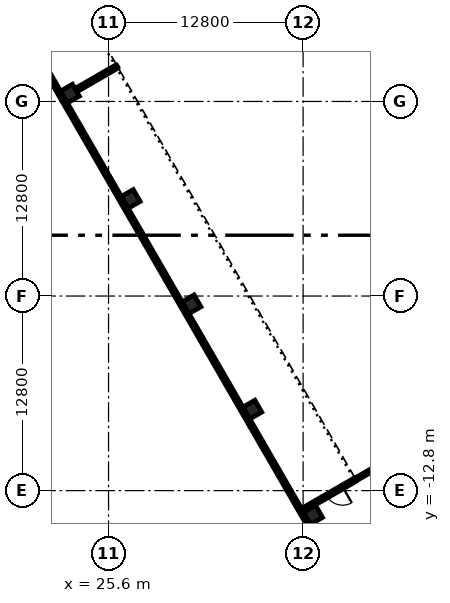
"""IFC4 building model, lengths in metres.
Left out: names, types, materials, properties, quantities, classifications, styles, units other than length and angle.
Written with IfcOpenShell. Run it as: python <this file> out.ifc"""

import sys

from ifc_helpers import new_model, si_unit, direction, frame, frame_2d, origin, origin_2d, place, context, subcontext, project, spatial, rectangle, extrude, element, fill, save


model = new_model("IFC4")
c1 = context("Model", 3, precision=1e-05, world=origin(), true_north=direction((0.0, 1.0)))
c2 = subcontext(c1, "Body", "Model", "MODEL_VIEW")
j1 = project(units=[si_unit("LENGTHUNIT", "METRE"), si_unit("PLANEANGLEUNIT", "RADIAN")], contexts=[c1])
p1 = place(None, origin())
s1 = spatial("IfcSite", under=j1, at=p1, CompositionType="ELEMENT")
p2 = place(p1, origin())
s2 = spatial("IfcBuilding", under=s1, at=p2, CompositionType="ELEMENT")
p3 = place(p2, origin())
s3 = spatial("IfcBuildingStorey", under=s2, at=p3, CompositionType="ELEMENT", Elevation=0.0)
p4 = place(p3, frame((20.355, 10.597, 2.1), z_axis=(0.191547193373, -0.34185939919, 0.920022730097), x_axis=(0.872390750772, 0.48880914268, 0.0)))
e1 = element("IfcColumn", 1, at=p4, inside=s3, PredefinedType="COLUMN", context=c2, shape_type="SweptSolid", body=[
    extrude(rectangle(XDim=1.8, YDim=1.6, at=origin_2d()), origin(), (0.0, 0.0, 1.0), 17.608),
])
p5 = place(p2, frame((0.0, 0.0, 11.4)))
s4 = spatial("IfcBuildingStorey", under=s2, at=p5, CompositionType="ELEMENT", Elevation=11.4)
for number, where, z_axis, x_axis in (
    (2, (39.061, -14.399, 0.0), (0.0, 0.0, 1.0), (-0.5, 0.866, 0.0)),
    (3, (35.061, -7.471, 0.0), (0.0, 0.0, 1.0), (-0.5, 0.866, 0.0)),
    (4, (31.061, -0.542, 0.0), (0.0, 0.0, 1.0), (-0.5, 0.866, 0.0)),
    (5, (27.061, 6.386, 0.0), (0.0, 0.0, 1.0), (-0.5, 0.866, 0.0)),
    (6, (23.061, 13.314, 0.0), (0.0, 0.0, 1.0), (-0.5, 0.866, 0.0)),
):
    element("IfcColumn", number, at=place(p5, frame(where, z_axis=z_axis, x_axis=x_axis)), inside=s4, PredefinedType="COLUMN", context=c2, shape_type="SweptSolid", body=[
        extrude(rectangle(XDim=0.9, YDim=0.9, at=origin_2d()), origin(), (0.0, 0.0, 1.0), 4.8),
    ])
p6 = place(p2, frame((0.0, 0.0, 6.0)))
s5 = spatial("IfcBuildingStorey", under=s2, at=p6, CompositionType="ELEMENT", Elevation=6.0)
p7 = place(p6, frame((26.178, 15.114, 0.0), z_axis=(0.0, 0.0, 1.0), x_axis=(0.866025540551, 0.499999763114, 0.0)))
e7 = element("IfcWall", 7, at=p7, inside=s5, PredefinedType="SOLIDWALL", context=c2, shape_type="SweptSolid", body=[
    extrude(rectangle(XDim=39.4, YDim=0.25, at=frame_2d((19.7, 0.0))), origin(), (0.0, 0.0, 1.0), 10.2),
])
p8 = place(p5, frame((42.562, -21.615, 0.0), z_axis=(0.0, 0.0, 1.0), x_axis=(-0.500001855621, 0.866024332438, 0.0)))
e8 = element("IfcWall", 8, at=p8, inside=s4, PredefinedType="SOLIDWALL", context=c2, shape_type="SweptSolid", body=[
    extrude(rectangle(XDim=10.312, YDim=0.25, at=frame_2d((5.156, 0.0))), origin(), (0.0, 0.0, 1.0), 4.5),
])
p9 = place(p5, frame((37.406, -12.684, 0.0), z_axis=(0.0, 0.0, 1.0), x_axis=(-0.500010275428, 0.866019471182, 0.0)))
e9 = element("IfcWall", 9, at=p9, inside=s4, PredefinedType="SOLIDWALL", context=c2, shape_type="SweptSolid", body=[
    extrude(rectangle(XDim=3.5, YDim=0.25, at=frame_2d((1.75, 0.0))), origin(), (0.0, 0.0, 1.0), 4.5),
])
p10 = place(p9, frame((0.25, 0.0, 0.9)))
e10 = element("IfcOpeningElement", 10, at=p10, cuts=e9, PredefinedType="OPENING", context=c2, shape_type="SweptSolid", body=[
    extrude(rectangle(XDim=3.0, YDim=2.2, at=frame_2d((1.5, 1.1))), frame((0.0, 0.135, 0.0), z_axis=(0.0, -1.0, 0.0), x_axis=(1.0, 0.0, 0.0)), (0.0, 0.0, 1.0), 0.27),
])
p11 = place(p5, frame((35.656, -9.653, 0.0), z_axis=(0.0, 0.0, 1.0), x_axis=(-0.499990705068, 0.866030770149, 0.0)))
e11 = element("IfcWall", 11, at=p11, inside=s4, PredefinedType="SOLIDWALL", context=c2, shape_type="SweptSolid", body=[
    extrude(rectangle(XDim=4.438, YDim=0.25, at=frame_2d((2.219, 0.0))), origin(), (0.0, 0.0, 1.0), 4.5),
])
p12 = place(p5, frame((33.438, -5.81, 0.0), z_axis=(0.0, 0.0, 1.0), x_axis=(-0.499980071345, 0.866036909293, 0.0)))
e12 = element("IfcWall", 12, at=p12, inside=s4, PredefinedType="SOLIDWALL", context=c2, shape_type="SweptSolid", body=[
    extrude(rectangle(XDim=3.5, YDim=0.25, at=frame_2d((1.75, 0.0))), origin(), (0.0, 0.0, 1.0), 4.5),
])
p13 = place(p12, frame((0.25, 0.0, 0.9)))
e13 = element("IfcOpeningElement", 13, at=p13, cuts=e12, PredefinedType="OPENING", context=c2, shape_type="SweptSolid", body=[
    extrude(rectangle(XDim=3.0, YDim=2.2, at=frame_2d((1.5, 1.1))), frame((0.0, 0.135, 0.0), z_axis=(0.0, -1.0, 0.0), x_axis=(1.0, 0.0, 0.0)), (0.0, 0.0, 1.0), 0.27),
])
p14 = place(p5, frame((31.688, -2.778, 0.0), z_axis=(0.0, 0.0, 1.0), x_axis=(-0.500013631625, 0.866017533419, 0.0)))
e14 = element("IfcWall", 14, at=p14, inside=s4, PredefinedType="SOLIDWALL", context=c2, shape_type="SweptSolid", body=[
    extrude(rectangle(XDim=4.5, YDim=0.25, at=frame_2d((2.25, 0.0))), origin(), (0.0, 0.0, 1.0), 4.5),
])
p15 = place(p5, frame((29.438, 1.119, 0.0), z_axis=(0.0, 0.0, 1.0), x_axis=(-0.499980071345, 0.866036909293, 0.0)))
e15 = element("IfcWall", 15, at=p15, inside=s4, PredefinedType="SOLIDWALL", context=c2, shape_type="SweptSolid", body=[
    extrude(rectangle(XDim=3.5, YDim=0.25, at=frame_2d((1.75, 0.0))), origin(), (0.0, 0.0, 1.0), 4.5),
])
p16 = place(p15, frame((0.25, 0.0, 0.9)))
e16 = element("IfcOpeningElement", 16, at=p16, cuts=e15, PredefinedType="OPENING", context=c2, shape_type="SweptSolid", body=[
    extrude(rectangle(XDim=3.0, YDim=2.2, at=frame_2d((1.5, 1.1))), frame((0.0, 0.135, 0.0), z_axis=(0.0, -1.0, 0.0), x_axis=(1.0, 0.0, 0.0)), (0.0, 0.0, 1.0), 0.27),
])
p17 = place(p5, frame((27.688, 4.15, 0.0), z_axis=(0.0, 0.0, 1.0), x_axis=(-0.500013631625, 0.866017533419, 0.0)))
e17 = element("IfcWall", 17, at=p17, inside=s4, PredefinedType="SOLIDWALL", context=c2, shape_type="SweptSolid", body=[
    extrude(rectangle(XDim=4.5, YDim=0.25, at=frame_2d((2.25, 0.0))), origin(), (0.0, 0.0, 1.0), 4.5),
])
p18 = place(p5, frame((25.438, 8.047, 0.0), z_axis=(0.0, 0.0, 1.0), x_axis=(-0.500010275428, 0.866019471182, 0.0)))
e18 = element("IfcWall", 18, at=p18, inside=s4, PredefinedType="SOLIDWALL", context=c2, shape_type="SweptSolid", body=[
    extrude(rectangle(XDim=3.5, YDim=0.25, at=frame_2d((1.75, 0.0))), origin(), (0.0, 0.0, 1.0), 4.5),
])
p19 = place(p18, frame((0.25, 0.0, 0.9)))
e19 = element("IfcOpeningElement", 19, at=p19, cuts=e18, PredefinedType="OPENING", context=c2, shape_type="SweptSolid", body=[
    extrude(rectangle(XDim=3.0, YDim=2.2, at=frame_2d((1.5, 1.1))), frame((0.0, 0.135, 0.0), z_axis=(0.0, -1.0, 0.0), x_axis=(1.0, 0.0, 0.0)), (0.0, 0.0, 1.0), 0.27),
])
p20 = place(p5, frame((23.688, 11.078, 0.0), z_axis=(0.0, 0.0, 1.0), x_axis=(-0.499990139034, 0.866031096941, 0.0)))
e20 = element("IfcWall", 20, at=p20, inside=s4, PredefinedType="SOLIDWALL", context=c2, shape_type="SweptSolid", body=[
    extrude(rectangle(XDim=4.5, YDim=0.25, at=frame_2d((2.25, 0.0))), origin(), (0.0, 0.0, 1.0), 4.5),
])
p21 = place(p5, frame((38.358, -14.083, 0.0), z_axis=(0.0, 0.0, 1.0), x_axis=(0.865989903783, 0.500061482766, 0.0)))
e21 = element("IfcWall", 21, at=p21, inside=s4, PredefinedType="SOLIDWALL", context=c2, shape_type="SweptSolid", body=[
    extrude(rectangle(XDim=1.6, YDim=0.25, at=frame_2d((0.8, 0.0))), origin(), (0.0, 0.0, 1.0), 3.9),
])
p22 = place(p5, frame((41.866, -12.058, 0.0), z_axis=(0.0, 0.0, 1.0), x_axis=(-0.866057815567, -0.499943856944, 0.0)))
e22 = element("IfcWall", 22, at=p22, inside=s4, PredefinedType="SOLIDWALL", context=c2, shape_type="SweptSolid", body=[
    extrude(rectangle(XDim=2.45, YDim=0.25, at=frame_2d((1.225, 0.0))), origin(), (0.0, 0.0, 1.0), 3.9),
])
p23 = place(p22, frame((1.0, 0.0, 0.0)))
e23 = element("IfcOpeningElement", 23, at=p23, cuts=e22, PredefinedType="OPENING", context=c2, shape_type="SweptSolid", body=[
    extrude(rectangle(XDim=1.2, YDim=2.1, at=frame_2d((0.6, 1.05))), frame((0.0, 0.135, 0.0), z_axis=(0.0, -1.0, 0.0), x_axis=(1.0, 0.0, 0.0)), (0.0, 0.0, 1.0), 0.27),
])
p24 = place(p5, frame((23.45, 13.539, 0.0), z_axis=(0.0, 0.0, 1.0), x_axis=(0.866035871367, 0.499981869177, 0.0)))
e24 = element("IfcWall", 24, at=p24, inside=s4, PredefinedType="SOLIDWALL", context=c2, shape_type="SweptSolid", body=[
    extrude(rectangle(XDim=3.15, YDim=0.25, at=frame_2d((1.575, 0.0))), origin(), (0.0, 0.0, 1.0), 3.9),
])
p25 = place(p5, frame((45.785, -14.846, 0.0), z_axis=(0.0, 0.0, 1.0), x_axis=(-0.866035395735, -0.499982693035, 0.0)))
e25 = element("IfcWall", 25, at=p25, inside=s4, PredefinedType="PARTITIONING", context=c2, shape_type="SweptSolid", body=[
    extrude(rectangle(XDim=3.6, YDim=0.2, at=frame_2d((1.8, 0.0))), origin(), (0.0, 0.0, 1.0), 3.9),
])
p26 = place(p25, frame((1.3, 0.0, 0.0)))
e26 = element("IfcOpeningElement", 26, at=p26, cuts=e25, PredefinedType="OPENING", context=c2, shape_type="SweptSolid", body=[
    extrude(rectangle(XDim=1.0, YDim=2.1, at=frame_2d((0.5, 1.05))), frame((0.0, 0.11, 0.0), z_axis=(0.0, -1.0, 0.0), x_axis=(1.0, 0.0, 0.0)), (0.0, 0.0, 1.0), 0.22),
])
p27 = place(p5, frame((41.866, -12.058, 0.0), z_axis=(0.0, 0.0, 1.0), x_axis=(0.866022857395, 0.50000441045, 0.0)))
e27 = element("IfcWall", 27, at=p27, inside=s4, PredefinedType="PARTITIONING", context=c2, shape_type="SweptSolid", body=[
    extrude(rectangle(XDim=39.4, YDim=0.2, at=frame_2d((19.7, 0.0))), origin(), (0.0, 0.0, 1.0), 3.9),
])
p28 = place(p10, origin())
e28 = element("IfcWindow", 28, at=p28, inside=s4, PartitioningType="SINGLE_PANEL", PredefinedType="WINDOW", context=c2, shape_type="SweptSolid", body=[
    extrude(rectangle(XDim=3.0, YDim=2.2, at=frame_2d((1.5, 1.1))), frame((0.0, 0.03, 0.0), z_axis=(0.0, -1.0, 0.0), x_axis=(1.0, 0.0, 0.0)), (0.0, 0.0, 1.0), 0.06),
])
fill(e10, e28)
p29 = place(p13, origin())
e29 = element("IfcWindow", 29, at=p29, inside=s4, PartitioningType="SINGLE_PANEL", PredefinedType="WINDOW", context=c2, shape_type="SweptSolid", body=[
    extrude(rectangle(XDim=3.0, YDim=2.2, at=frame_2d((1.5, 1.1))), frame((0.0, 0.03, 0.0), z_axis=(0.0, -1.0, 0.0), x_axis=(1.0, 0.0, 0.0)), (0.0, 0.0, 1.0), 0.06),
])
fill(e13, e29)
p30 = place(p16, origin())
e30 = element("IfcWindow", 30, at=p30, inside=s4, PartitioningType="SINGLE_PANEL", PredefinedType="WINDOW", context=c2, shape_type="SweptSolid", body=[
    extrude(rectangle(XDim=3.0, YDim=2.2, at=frame_2d((1.5, 1.1))), frame((0.0, 0.03, 0.0), z_axis=(0.0, -1.0, 0.0), x_axis=(1.0, 0.0, 0.0)), (0.0, 0.0, 1.0), 0.06),
])
fill(e16, e30)
p31 = place(p19, origin())
e31 = element("IfcWindow", 31, at=p31, inside=s4, PartitioningType="SINGLE_PANEL", PredefinedType="WINDOW", context=c2, shape_type="SweptSolid", body=[
    extrude(rectangle(XDim=3.0, YDim=2.2, at=frame_2d((1.5, 1.1))), frame((0.0, 0.03, 0.0), z_axis=(0.0, -1.0, 0.0), x_axis=(1.0, 0.0, 0.0)), (0.0, 0.0, 1.0), 0.06),
])
fill(e19, e31)
p32 = place(p23, origin())
e32 = element("IfcDoor", 32, at=p32, inside=s4, OperationType="SINGLE_SWING_LEFT", PredefinedType="DOOR", context=c2, shape_type="SweptSolid", body=[
    extrude(rectangle(XDim=1.2, YDim=2.1, at=frame_2d((0.6, 1.05))), frame((0.0, 0.025, 0.0), z_axis=(0.0, -1.0, 0.0), x_axis=(1.0, 0.0, 0.0)), (0.0, 0.0, 1.0), 0.05),
])
fill(e23, e32)
save(model, sys.argv[1])
